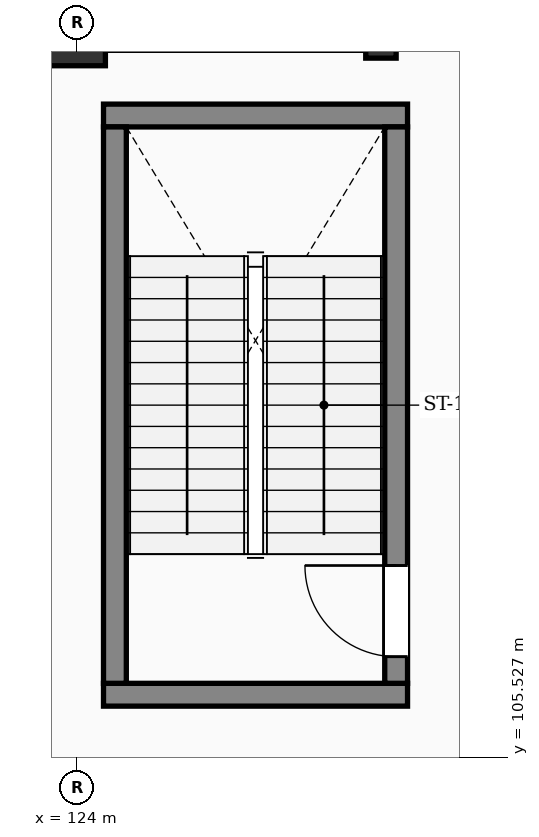
"""IFC4 building model, lengths in metres.
Left out: names, types, materials, properties, quantities, classifications, styles, units other than length and angle.
Written with IfcOpenShell. Run it as: python <this file> out.ifc"""

import sys

from ifc_helpers import new_model, si_unit, direction, frame, frame_2d, origin, origin_2d, place, context, subcontext, project, spatial, rectangle, extrude, element, fill, save


model = new_model("IFC4")
c1 = context("Model", 3, precision=1e-05, world=origin(), true_north=direction((0.0, 1.0)))
c2 = subcontext(c1, "Body", "Model", "MODEL_VIEW")
j1 = project(units=[si_unit("LENGTHUNIT", "METRE"), si_unit("PLANEANGLEUNIT", "RADIAN")], contexts=[c1])
p1 = place(None, origin())
s1 = spatial("IfcSite", under=j1, at=p1, CompositionType="ELEMENT")
p2 = place(p1, origin())
s2 = spatial("IfcBuilding", under=s1, at=p2, CompositionType="ELEMENT")
p3 = place(p2, frame((0.0, 0.0, 4.8)))
s3 = spatial("IfcBuildingStorey", under=s2, at=p3, CompositionType="ELEMENT", Elevation=4.8)
p4 = place(p3, frame((124.0, 115.0, 0.0), z_axis=(0.0, 0.0, 1.0), x_axis=(1.0, 0.0, 0.0)))
e1 = element("IfcColumn", 1, at=p4, inside=s3, PredefinedType="COLUMN", context=c2, shape_type="SweptSolid", body=[
    extrude(rectangle(XDim=0.75, YDim=0.75, at=origin_2d()), origin(), (0.0, 0.0, 1.0), 4.5),
])
p5 = place(p3, frame((128.0, 115.0, 0.0), z_axis=(0.0, 0.0, 1.0), x_axis=(1.0, 0.0, 0.0)))
e2 = element("IfcColumn", 2, at=p5, inside=s3, PredefinedType="PILASTER", context=c2, shape_type="SweptSolid", body=[
    extrude(rectangle(XDim=0.4, YDim=0.55, at=origin_2d()), origin(), (0.0, 0.0, 1.0), 4.5),
])
for number, where, z_axis, x_axis in (
    (3, (124.35, 106.35, 0.0), (0.0, 0.0, 1.0), (1.0, 0.0, 0.0)),
    (4, (128.35, 113.97, 0.0), (0.0, 0.0, 1.0), (-1.0, 0.0, 0.0)),
):
    element("IfcWall", number, at=place(p3, frame(where, z_axis=z_axis, x_axis=x_axis)), inside=s3, PredefinedType="SHEAR", context=c2, shape_type="SweptSolid", body=[
        extrude(rectangle(XDim=4.0, YDim=0.3, at=frame_2d((2.0, 0.0))), origin(), (0.0, 0.0, 1.0), 4.25),
    ])
p6 = place(p3, frame((124.5, 106.5, 0.0), z_axis=(0.0, 0.0, 1.0), x_axis=(0.0, 1.0, 0.0)))
e5 = element("IfcWall", 5, at=p6, inside=s3, PredefinedType="SHEAR", context=c2, shape_type="SweptSolid", body=[
    extrude(rectangle(XDim=7.32, YDim=0.3, at=frame_2d((3.66, 0.0))), origin(), (0.0, 0.0, 1.0), 4.25),
])
p7 = place(p3, frame((128.2, 106.5, 0.0), z_axis=(0.0, 0.0, 1.0), x_axis=(0.0, 1.0, 0.0)))
e6 = element("IfcWall", 6, at=p7, inside=s3, PredefinedType="SHEAR", context=c2, shape_type="SweptSolid", body=[
    extrude(rectangle(XDim=7.32, YDim=0.3, at=frame_2d((3.66, 0.0))), origin(), (0.0, 0.0, 1.0), 4.25),
])
p8 = place(p7, frame((0.35, 0.0, 0.0)))
e7 = element("IfcOpeningElement", 7, at=p8, cuts=e6, PredefinedType="OPENING", context=c2, shape_type="SweptSolid", body=[
    extrude(rectangle(XDim=1.2, YDim=2.15, at=frame_2d((0.6, 1.075))), frame((0.0, 0.16, 0.0), z_axis=(0.0, -1.0, 0.0), x_axis=(1.0, 0.0, 0.0)), (0.0, 0.0, 1.0), 0.32),
])
p9 = place(p8, origin())
e8 = element("IfcDoor", 8, at=p9, inside=s3, OperationType="SINGLE_SWING_RIGHT", PredefinedType="DOOR", context=c2, shape_type="SweptSolid", body=[
    extrude(rectangle(XDim=1.2, YDim=2.15, at=frame_2d((0.6, 1.075))), frame((0.0, 0.025, 0.0), z_axis=(0.0, -1.0, 0.0), x_axis=(1.0, 0.0, 0.0)), (0.0, 0.0, 1.0), 0.05),
])
fill(e7, e8)
save(model, sys.argv[1])
